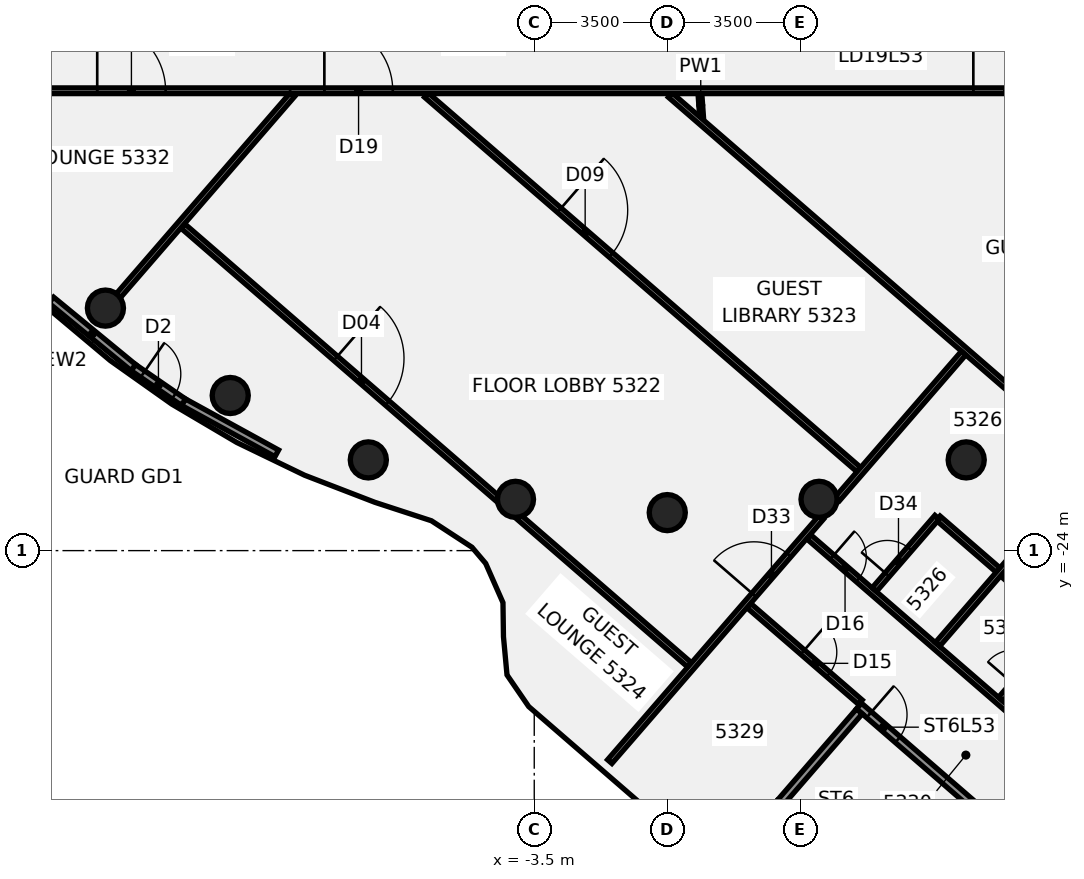
"""IFC4 building model, lengths in metres.
Left out: names, types, materials, properties, quantities, classifications, styles, units other than length and angle.
Written with IfcOpenShell. Run it as: python <this file> out.ifc"""

import sys

from ifc_helpers import new_model, si_unit, direction, frame, frame_2d, origin, origin_2d, place, context, subcontext, project, spatial, rectangle, circle, extrude, element, fill, save


model = new_model("IFC4")
c1 = context("Model", 3, precision=1e-05, world=origin(), true_north=direction((0.0, 1.0)))
c2 = subcontext(c1, "Body", "Model", "MODEL_VIEW")
j1 = project(units=[si_unit("LENGTHUNIT", "METRE"), si_unit("PLANEANGLEUNIT", "RADIAN")], contexts=[c1])
p1 = place(None, origin())
s1 = spatial("IfcSite", under=j1, at=p1, CompositionType="ELEMENT")
p2 = place(p1, origin())
s2 = spatial("IfcBuilding", under=s1, at=p2, CompositionType="ELEMENT")
p3 = place(p2, frame((0.0, 0.0, 211.3)))
s3 = spatial("IfcBuildingStorey", under=s2, at=p3, CompositionType="ELEMENT", Elevation=211.3)
for number, where, z_axis, x_axis in (
    (1, (-14.784, -17.619, -0.14), (0.0, 0.0, 1.0), (1.0, 0.0, 0.0)),
    (2, (-11.5, -19.919, -0.14), (0.0, 0.0, 1.0), (1.0, 0.0, 0.0)),
    (3, (-7.866, -21.613, -0.14), (0.0, 0.0, 1.0), (1.0, 0.0, 0.0)),
    (4, (-3.994, -22.651, -0.14), (0.0, 0.0, 1.0), (1.0, 0.0, 0.0)),
    (5, (0.0, -23.0, -0.14), (0.0, 0.0, 1.0), (1.0, 0.0, 0.0)),
    (6, (3.994, -22.651, -0.14), (0.0, 0.0, 1.0), (1.0, 0.0, 0.0)),
    (7, (7.866, -21.613, -0.14), (0.0, 0.0, 1.0), (1.0, 0.0, 0.0)),
):
    element("IfcColumn", number, at=place(p3, frame(where, z_axis=z_axis, x_axis=x_axis)), inside=s3, PredefinedType="COLUMN", context=c2, shape_type="SweptSolid", body=[
        extrude(circle(Radius=0.475, at=origin_2d()), origin(), (0.0, 0.0, 1.0), 3.56),
    ])
p4 = place(p3, frame((0.858, -11.96, 0.0), z_axis=(0.0, 0.0, 1.0), x_axis=(0.071301243395, -0.997454827393, 0.0)))
e8 = element("IfcWall", 8, at=p4, inside=s3, PredefinedType="PARTITIONING", context=c2, shape_type="SweptSolid", body=[
    extrude(rectangle(XDim=0.64, YDim=0.1, at=frame_2d((0.32, 0.0))), origin(), (0.0, 0.0, 1.0), 2.824),
])
p5 = place(p3, frame((-12.749, -15.458, 0.0), z_axis=(0.0, 0.0, 1.0), x_axis=(0.755941384567, -0.654639307634, 0.0)))
e9 = element("IfcWall", 9, at=p5, inside=s3, PredefinedType="PARTITIONING", context=c2, shape_type="SweptSolid", body=[
    extrude(rectangle(XDim=10.949, YDim=0.15, at=frame_2d((5.474, 0.0))), origin(), (0.0, 0.0, 1.0), 2.824),
])
p6 = place(p5, frame((5.32, 0.0, 0.0)))
e10 = element("IfcOpeningElement", 10, at=p6, cuts=e9, PredefinedType="OPENING", context=c2, shape_type="SweptSolid", body=[
    extrude(rectangle(XDim=1.8, YDim=2.1, at=frame_2d((0.9, 1.05))), frame((0.0, 0.085, 0.0), z_axis=(0.0, -1.0, 0.0), x_axis=(1.0, 0.0, 0.0)), (0.0, 0.0, 1.0), 0.17),
])
p7 = place(p3, frame((-3.909, -23.113, 0.0), z_axis=(0.0, 0.0, 1.0), x_axis=(0.755934223214, -0.654647577078, 0.0)))
e11 = element("IfcWall", 11, at=p7, inside=s3, PredefinedType="PARTITIONING", context=c2, shape_type="SweptSolid", body=[
    extrude(rectangle(XDim=5.947, YDim=0.15, at=frame_2d((2.973, 0.0))), origin(), (0.0, 0.0, 1.0), 2.824),
])
p8 = place(p3, frame((-6.337, -12.015, 0.0), z_axis=(0.0, 0.0, 1.0), x_axis=(0.755914954944, -0.654669825861, 0.0)))
e12 = element("IfcWall", 12, at=p8, inside=s3, PredefinedType="PARTITIONING", context=c2, shape_type="SweptSolid", body=[
    extrude(rectangle(XDim=15.047, YDim=0.15, at=frame_2d((7.523, 0.0))), origin(), (0.0, 0.0, 1.0), 2.824),
])
p9 = place(p8, frame((4.625, 0.0, 0.0)))
e13 = element("IfcOpeningElement", 13, at=p9, cuts=e12, PredefinedType="OPENING", context=c2, shape_type="SweptSolid", body=[
    extrude(rectangle(XDim=1.8, YDim=2.1, at=frame_2d((0.9, 1.05))), frame((0.0, 0.085, 0.0), z_axis=(0.0, -1.0, 0.0), x_axis=(1.0, 0.0, 0.0)), (0.0, 0.0, 1.0), 0.17),
])
p10 = place(p3, frame((0.079, -12.015, 0.0), z_axis=(0.0, 0.0, 1.0), x_axis=(0.75590683431, -0.654679202238, 0.0)))
e14 = element("IfcWall", 14, at=p10, inside=s3, PredefinedType="PARTITIONING", context=c2, shape_type="SweptSolid", body=[
    extrude(rectangle(XDim=16.089, YDim=0.15, at=frame_2d((8.044, 0.0))), origin(), (0.0, 0.0, 1.0), 2.824),
])
p11 = place(p3, frame((2.147, -25.448, 0.0), z_axis=(0.0, 0.0, 1.0), x_axis=(0.756054321619, -0.654508871415, 0.0)))
e15 = element("IfcWall", 15, at=p11, inside=s3, PredefinedType="PARTITIONING", context=c2, shape_type="SweptSolid", body=[
    extrude(rectangle(XDim=3.88, YDim=0.15, at=frame_2d((1.94, 0.0))), origin(), (0.0, 0.0, 1.0), 2.72),
])
p12 = place(p11, frame((1.87, 0.0, 0.0)))
e16 = element("IfcOpeningElement", 16, at=p12, cuts=e15, PredefinedType="OPENING", context=c2, shape_type="SweptSolid", body=[
    extrude(rectangle(XDim=0.9, YDim=2.1, at=frame_2d((0.45, 1.05))), frame((0.0, 0.085, 0.0), z_axis=(0.0, -1.0, 0.0), x_axis=(1.0, 0.0, 0.0)), (0.0, 0.0, 1.0), 0.17),
])
p13 = place(p3, frame((3.719, -23.633, 0.0), z_axis=(0.0, 0.0, 1.0), x_axis=(0.755913669582, -0.654671310001, 0.0)))
e17 = element("IfcWall", 17, at=p13, inside=s3, PredefinedType="PARTITIONING", context=c2, shape_type="SweptSolid", body=[
    extrude(rectangle(XDim=13.34, YDim=0.15, at=frame_2d((6.67, 0.0))), origin(), (0.0, 0.0, 1.0), 2.72),
])
p14 = place(p13, frame((0.82, 0.0, 0.0)))
e18 = element("IfcOpeningElement", 18, at=p14, cuts=e17, PredefinedType="OPENING", context=c2, shape_type="SweptSolid", body=[
    extrude(rectangle(XDim=0.9, YDim=2.1, at=frame_2d((0.45, 1.05))), frame((0.0, 0.085, 0.0), z_axis=(0.0, -1.0, 0.0), x_axis=(1.0, 0.0, 0.0)), (0.0, 0.0, 1.0), 0.17),
])
p15 = place(p13, frame((7.52, 0.0, 0.0)))
e19 = element("IfcOpeningElement", 19, at=p15, cuts=e17, PredefinedType="OPENING", context=c2, shape_type="SweptSolid", body=[
    extrude(rectangle(XDim=0.9, YDim=2.1, at=frame_2d((0.45, 1.05))), frame((0.0, 0.085, 0.0), z_axis=(0.0, -1.0, 0.0), x_axis=(1.0, 0.0, 0.0)), (0.0, 0.0, 1.0), 0.17),
])
p16 = place(p13, frame((9.82, 0.0, 0.0)))
e20 = element("IfcOpeningElement", 20, at=p16, cuts=e17, PredefinedType="OPENING", context=c2, shape_type="SweptSolid", body=[
    extrude(rectangle(XDim=0.9, YDim=2.1, at=frame_2d((0.45, 1.05))), frame((0.0, 0.085, 0.0), z_axis=(0.0, -1.0, 0.0), x_axis=(1.0, 0.0, 0.0)), (0.0, 0.0, 1.0), 0.17),
])
p17 = place(p3, frame((7.129, -23.147, 0.0), z_axis=(0.0, 0.0, 1.0), x_axis=(0.756004108668, -0.654566870287, 0.0)))
e21 = element("IfcWall", 21, at=p17, inside=s3, PredefinedType="PARTITIONING", context=c2, shape_type="SweptSolid", body=[
    extrude(rectangle(XDim=4.32, YDim=0.15, at=frame_2d((2.16, 0.0))), origin(), (0.0, 0.0, 1.0), 2.72),
])
p18 = place(p3, frame((-17.1, -11.9, 0.0), z_axis=(0.0, 0.0, 1.0), x_axis=(1.0, 0.0, 0.0)))
e22 = element("IfcWall", 22, at=p18, inside=s3, PredefinedType="PARTITIONING", context=c2, shape_type="SweptSolid", body=[
    extrude(rectangle(XDim=34.165, YDim=0.15, at=frame_2d((17.083, 0.0))), origin(), (0.0, 0.0, 1.0), 2.824),
])
p19 = place(p18, frame((8.077, 0.0, 0.0)))
e23 = element("IfcOpeningElement", 23, at=p19, cuts=e22, PredefinedType="OPENING", context=c2, shape_type="SweptSolid", body=[
    extrude(rectangle(XDim=1.8, YDim=2.1, at=frame_2d((0.9, 1.05))), frame((0.0, 0.085, 0.0), z_axis=(0.0, -1.0, 0.0), x_axis=(1.0, 0.0, 0.0)), (0.0, 0.0, 1.0), 0.17),
])
p20 = place(p18, frame((2.1, 0.0, 0.0)))
e24 = element("IfcOpeningElement", 24, at=p20, cuts=e22, PredefinedType="OPENING", context=c2, shape_type="SweptSolid", body=[
    extrude(rectangle(XDim=1.8, YDim=2.1, at=frame_2d((0.9, 1.05))), frame((0.0, 0.085, 0.0), z_axis=(0.0, -1.0, 0.0), x_axis=(1.0, 0.0, 0.0)), (0.0, 0.0, 1.0), 0.17),
])
p21 = place(p18, frame((25.154, 0.0, 0.0)))
e25 = element("IfcOpeningElement", 25, at=p21, cuts=e22, PredefinedType="OPENING", context=c2, shape_type="SweptSolid", body=[
    extrude(rectangle(XDim=1.8, YDim=2.1, at=frame_2d((0.9, 1.05))), frame((0.0, 0.085, 0.0), z_axis=(0.0, -1.0, 0.0), x_axis=(1.0, 0.0, 0.0)), (0.0, 0.0, 1.0), 0.17),
])
p22 = place(p3, frame((-14.446, -17.295, 0.0), z_axis=(0.0, 0.0, 1.0), x_axis=(0.654627623615, 0.755951502678, 0.0)))
e26 = element("IfcWall", 26, at=p22, inside=s3, PredefinedType="PARTITIONING", context=c2, shape_type="SweptSolid", body=[
    extrude(rectangle(XDim=6.997, YDim=0.15, at=frame_2d((3.499, 0.0))), origin(), (0.0, 0.0, 1.0), 2.824),
])
p23 = place(p3, frame((-1.513, -29.552, 0.0), z_axis=(0.0, 0.0, 1.0), x_axis=(0.65472740131, 0.755865087151, 0.0)))
e27 = element("IfcWall", 27, at=p23, inside=s3, PredefinedType="PARTITIONING", context=c2, shape_type="SweptSolid", body=[
    extrude(rectangle(XDim=8.511, YDim=0.15, at=frame_2d((4.256, 0.0))), origin(), (0.0, 0.0, 1.0), 2.82),
])
p24 = place(p23, frame((5.799, 0.0, 0.0)))
e28 = element("IfcOpeningElement", 28, at=p24, cuts=e27, PredefinedType="OPENING", context=c2, shape_type="SweptSolid", body=[
    extrude(rectangle(XDim=1.4, YDim=2.1, at=frame_2d((0.7, 1.05))), frame((0.0, 0.085, 0.0), z_axis=(0.0, -1.0, 0.0), x_axis=(1.0, 0.0, 0.0)), (0.0, 0.0, 1.0), 0.17),
])
p25 = place(p3, frame((4.476, -22.638, 0.0), z_axis=(0.0, 0.0, 1.0), x_axis=(0.654754589799, 0.755841535732, 0.0)))
e29 = element("IfcWall", 29, at=p25, inside=s3, PredefinedType="PARTITIONING", context=c2, shape_type="SweptSolid", body=[
    extrude(rectangle(XDim=5.072, YDim=0.15, at=frame_2d((2.536, 0.0))), origin(), (0.0, 0.0, 1.0), 2.824),
])
p26 = place(p3, frame((5.449, -25.025, 0.0), z_axis=(0.0, 0.0, 1.0), x_axis=(0.654764510889, 0.755832941384, 0.0)))
e30 = element("IfcWall", 30, at=p26, inside=s3, PredefinedType="PARTITIONING", context=c2, shape_type="SweptSolid", body=[
    extrude(rectangle(XDim=2.52, YDim=0.15, at=frame_2d((1.26, 0.0))), origin(), (0.0, 0.0, 1.0), 2.824),
])
p27 = place(p26, frame((0.52, 0.0, 0.0)))
e31 = element("IfcOpeningElement", 31, at=p27, cuts=e30, PredefinedType="OPENING", context=c2, shape_type="SweptSolid", body=[
    extrude(rectangle(XDim=0.9, YDim=2.1, at=frame_2d((0.45, 1.05))), frame((0.0, 0.085, 0.0), z_axis=(0.0, -1.0, 0.0), x_axis=(1.0, 0.0, 0.0)), (0.0, 0.0, 1.0), 0.17),
])
p28 = place(p3, frame((7.112, -26.467, 0.0), z_axis=(0.0, 0.0, 1.0), x_axis=(0.654527416429, 0.756038266983, 0.0)))
e32 = element("IfcWall", 32, at=p28, inside=s3, PredefinedType="PARTITIONING", context=c2, shape_type="SweptSolid", body=[
    extrude(rectangle(XDim=3.759, YDim=0.15, at=frame_2d((1.879, 0.0))), origin(), (0.0, 0.0, 1.0), 2.82),
])
p29 = place(p3, frame((8.775, -27.906, 0.0), z_axis=(0.0, 0.0, 1.0), x_axis=(0.65471655717, 0.755874480167, 0.0)))
e33 = element("IfcWall", 33, at=p29, inside=s3, PredefinedType="PARTITIONING", context=c2, shape_type="SweptSolid", body=[
    extrude(rectangle(XDim=2.52, YDim=0.15, at=frame_2d((1.26, 0.0))), origin(), (0.0, 0.0, 1.0), 2.82),
])
p30 = place(p29, frame((0.52, 0.0, 0.0)))
e34 = element("IfcOpeningElement", 34, at=p30, cuts=e33, PredefinedType="OPENING", context=c2, shape_type="SweptSolid", body=[
    extrude(rectangle(XDim=0.9, YDim=2.1, at=frame_2d((0.45, 1.05))), frame((0.0, 0.085, 0.0), z_axis=(0.0, -1.0, 0.0), x_axis=(1.0, 0.0, 0.0)), (0.0, 0.0, 1.0), 0.17),
])
p31 = place(p3, frame((-16.211, -17.408, 0.0), z_axis=(0.0, 0.0, 1.0), x_axis=(0.772584195676, -0.634912325122, 0.0)))
e35 = element("IfcWall", 35, at=p31, inside=s3, PredefinedType="SOLIDWALL", context=c2, shape_type="SweptSolid", body=[
    extrude(rectangle(XDim=2.8, YDim=0.2, at=frame_2d((1.4, 0.0))), origin(), (0.0, 0.0, 1.0), 3.42),
])
p32 = place(p3, frame((-12.731, -20.094, 0.0), z_axis=(0.0, 0.0, 1.0), x_axis=(0.87680055268, -0.480854230323, 0.0)))
e36 = element("IfcWall", 36, at=p32, inside=s3, PredefinedType="SOLIDWALL", context=c2, shape_type="SweptSolid", body=[
    extrude(rectangle(XDim=2.801, YDim=0.2, at=frame_2d((1.4, 0.0))), origin(), (0.0, 0.0, 1.0), 3.42),
])
p33 = place(p3, frame((-14.047, -19.186, 0.0), z_axis=(0.0, 0.0, 1.0), x_axis=(0.823185720552, -0.567772198578, 0.0)))
e37 = element("IfcWall", 37, at=p33, inside=s3, PredefinedType="SOLIDWALL", context=c2, shape_type="SweptSolid", body=[
    extrude(rectangle(XDim=1.599, YDim=0.2, at=frame_2d((0.8, 0.0))), origin(), (0.0, 0.0, 1.0), 3.42),
])
p34 = place(p33, frame((0.3, 0.0, 0.0)))
e38 = element("IfcOpeningElement", 38, at=p34, cuts=e37, PredefinedType="OPENING", context=c2, shape_type="SweptSolid", body=[
    extrude(rectangle(XDim=1.0, YDim=2.4, at=frame_2d((0.5, 1.2))), frame((0.0, 0.11, 0.0), z_axis=(0.0, -1.0, 0.0), x_axis=(1.0, 0.0, 0.0)), (0.0, 0.0, 1.0), 0.22),
])
p35 = place(p3, frame((5.045, -28.089, -0.14), z_axis=(0.0, 0.0, 1.0), x_axis=(0.755907864572, -0.654678012674, 0.0)))
e39 = element("IfcWall", 39, at=p35, inside=s3, PredefinedType="SHEAR", context=c2, shape_type="SweptSolid", body=[
    extrude(rectangle(XDim=6.7, YDim=0.2, at=frame_2d((3.35, 0.0))), origin(), (0.0, 0.0, 1.0), 2.86),
])
p36 = place(p35, frame((0.35, 0.0, 0.0)))
e40 = element("IfcOpeningElement", 40, at=p36, cuts=e39, PredefinedType="OPENING", context=c2, shape_type="SweptSolid", body=[
    extrude(rectangle(XDim=1.0, YDim=2.1, at=frame_2d((0.5, 1.05))), frame((0.0, 0.11, 0.0), z_axis=(0.0, -1.0, 0.0), x_axis=(1.0, 0.0, 0.0)), (0.0, 0.0, 1.0), 0.22),
])
p37 = place(p3, frame((2.96, -30.649, -0.14), z_axis=(0.0, 0.0, 1.0), x_axis=(0.654671993933, 0.755913077251, 0.0)))
e41 = element("IfcWall", 41, at=p37, inside=s3, PredefinedType="SHEAR", context=c2, shape_type="SweptSolid", body=[
    extrude(rectangle(XDim=3.2, YDim=0.2, at=frame_2d((1.6, 0.0))), origin(), (0.0, 0.0, 1.0), 2.86),
])
p38 = place(p6, frame((1.8, 0.0, 0.0), z_axis=(0.0, 0.0, 1.0), x_axis=(-1.0, 0.0, 0.0)))
e42 = element("IfcDoor", 42, at=p38, inside=s3, OperationType="DOUBLE_DOOR_SINGLE_SWING", PredefinedType="DOOR", context=c2, shape_type="SweptSolid", body=[
    extrude(rectangle(XDim=1.8, YDim=2.1, at=frame_2d((0.9, 1.05))), frame((0.0, 0.025, 0.0), z_axis=(0.0, -1.0, 0.0), x_axis=(1.0, 0.0, 0.0)), (0.0, 0.0, 1.0), 0.05),
])
fill(e10, e42)
p39 = place(p9, origin())
e43 = element("IfcDoor", 43, at=p39, inside=s3, OperationType="DOUBLE_DOOR_SINGLE_SWING", PredefinedType="DOOR", context=c2, shape_type="SweptSolid", body=[
    extrude(rectangle(XDim=1.8, YDim=2.1, at=frame_2d((0.9, 1.05))), frame((0.0, 0.025, 0.0), z_axis=(0.0, -1.0, 0.0), x_axis=(1.0, 0.0, 0.0)), (0.0, 0.0, 1.0), 0.05),
])
fill(e13, e43)
p40 = place(p12, frame((0.9, 0.0, 0.0), z_axis=(0.0, 0.0, 1.0), x_axis=(-1.0, 0.0, 0.0)))
e44 = element("IfcDoor", 44, at=p40, inside=s3, OperationType="SINGLE_SWING_RIGHT", PredefinedType="DOOR", context=c2, shape_type="SweptSolid", body=[
    extrude(rectangle(XDim=0.9, YDim=2.1, at=frame_2d((0.45, 1.05))), frame((0.0, 0.025, 0.0), z_axis=(0.0, -1.0, 0.0), x_axis=(1.0, 0.0, 0.0)), (0.0, 0.0, 1.0), 0.05),
])
fill(e16, e44)
p41 = place(p14, origin())
e45 = element("IfcDoor", 45, at=p41, inside=s3, OperationType="SINGLE_SWING_RIGHT", PredefinedType="DOOR", context=c2, shape_type="SweptSolid", body=[
    extrude(rectangle(XDim=0.9, YDim=2.1, at=frame_2d((0.45, 1.05))), frame((0.0, 0.025, 0.0), z_axis=(0.0, -1.0, 0.0), x_axis=(1.0, 0.0, 0.0)), (0.0, 0.0, 1.0), 0.05),
])
fill(e18, e45)
p42 = place(p19, origin())
e46 = element("IfcDoor", 46, at=p42, inside=s3, OperationType="DOUBLE_DOOR_SINGLE_SWING", PredefinedType="DOOR", context=c2, shape_type="SweptSolid", body=[
    extrude(rectangle(XDim=1.8, YDim=2.1, at=frame_2d((0.9, 1.05))), frame((0.0, 0.025, 0.0), z_axis=(0.0, -1.0, 0.0), x_axis=(1.0, 0.0, 0.0)), (0.0, 0.0, 1.0), 0.05),
])
fill(e23, e46)
p43 = place(p20, frame((1.8, 0.0, 0.0), z_axis=(0.0, 0.0, 1.0), x_axis=(-1.0, 0.0, 0.0)))
e47 = element("IfcDoor", 47, at=p43, inside=s3, OperationType="DOUBLE_DOOR_SINGLE_SWING", PredefinedType="DOOR", context=c2, shape_type="SweptSolid", body=[
    extrude(rectangle(XDim=1.8, YDim=2.1, at=frame_2d((0.9, 1.05))), frame((0.0, 0.025, 0.0), z_axis=(0.0, -1.0, 0.0), x_axis=(1.0, 0.0, 0.0)), (0.0, 0.0, 1.0), 0.05),
])
fill(e24, e47)
p44 = place(p21, origin())
e48 = element("IfcDoor", 48, at=p44, inside=s3, OperationType="DOUBLE_DOOR_SINGLE_SWING", PredefinedType="DOOR", context=c2, shape_type="SweptSolid", body=[
    extrude(rectangle(XDim=1.8, YDim=2.1, at=frame_2d((0.9, 1.05))), frame((0.0, 0.025, 0.0), z_axis=(0.0, -1.0, 0.0), x_axis=(1.0, 0.0, 0.0)), (0.0, 0.0, 1.0), 0.05),
])
fill(e25, e48)
p45 = place(p24, origin())
e49 = element("IfcDoor", 49, at=p45, inside=s3, OperationType="DOUBLE_DOOR_SINGLE_SWING", PredefinedType="DOOR", context=c2, shape_type="SweptSolid", body=[
    extrude(rectangle(XDim=1.4, YDim=2.1, at=frame_2d((0.7, 1.05))), frame((0.0, 0.025, 0.0), z_axis=(0.0, -1.0, 0.0), x_axis=(1.0, 0.0, 0.0)), (0.0, 0.0, 1.0), 0.05),
])
fill(e28, e49)
p46 = place(p27, frame((0.9, 0.0, 0.0), z_axis=(0.0, 0.0, 1.0), x_axis=(-1.0, 0.0, 0.0)))
e50 = element("IfcDoor", 50, at=p46, inside=s3, OperationType="SINGLE_SWING_LEFT", PredefinedType="DOOR", context=c2, shape_type="SweptSolid", body=[
    extrude(rectangle(XDim=0.9, YDim=2.1, at=frame_2d((0.45, 1.05))), frame((0.0, 0.025, 0.0), z_axis=(0.0, -1.0, 0.0), x_axis=(1.0, 0.0, 0.0)), (0.0, 0.0, 1.0), 0.05),
])
fill(e31, e50)
p47 = place(p34, origin())
e51 = element("IfcDoor", 51, at=p47, inside=s3, OperationType="SINGLE_SWING_LEFT", PredefinedType="DOOR", context=c2, shape_type="SweptSolid", body=[
    extrude(rectangle(XDim=1.0, YDim=2.4, at=frame_2d((0.5, 1.2))), frame((0.0, 0.025, 0.0), z_axis=(0.0, -1.0, 0.0), x_axis=(1.0, 0.0, 0.0)), (0.0, 0.0, 1.0), 0.05),
])
fill(e38, e51)
p48 = place(p36, origin())
e52 = element("IfcDoor", 52, at=p48, inside=s3, OperationType="SINGLE_SWING_LEFT", PredefinedType="DOOR", context=c2, shape_type="SweptSolid", body=[
    extrude(rectangle(XDim=1.0, YDim=2.1, at=frame_2d((0.5, 1.05))), frame((0.0, 0.025, 0.0), z_axis=(0.0, -1.0, 0.0), x_axis=(1.0, 0.0, 0.0)), (0.0, 0.0, 1.0), 0.05),
])
fill(e40, e52)
save(model, sys.argv[1])
